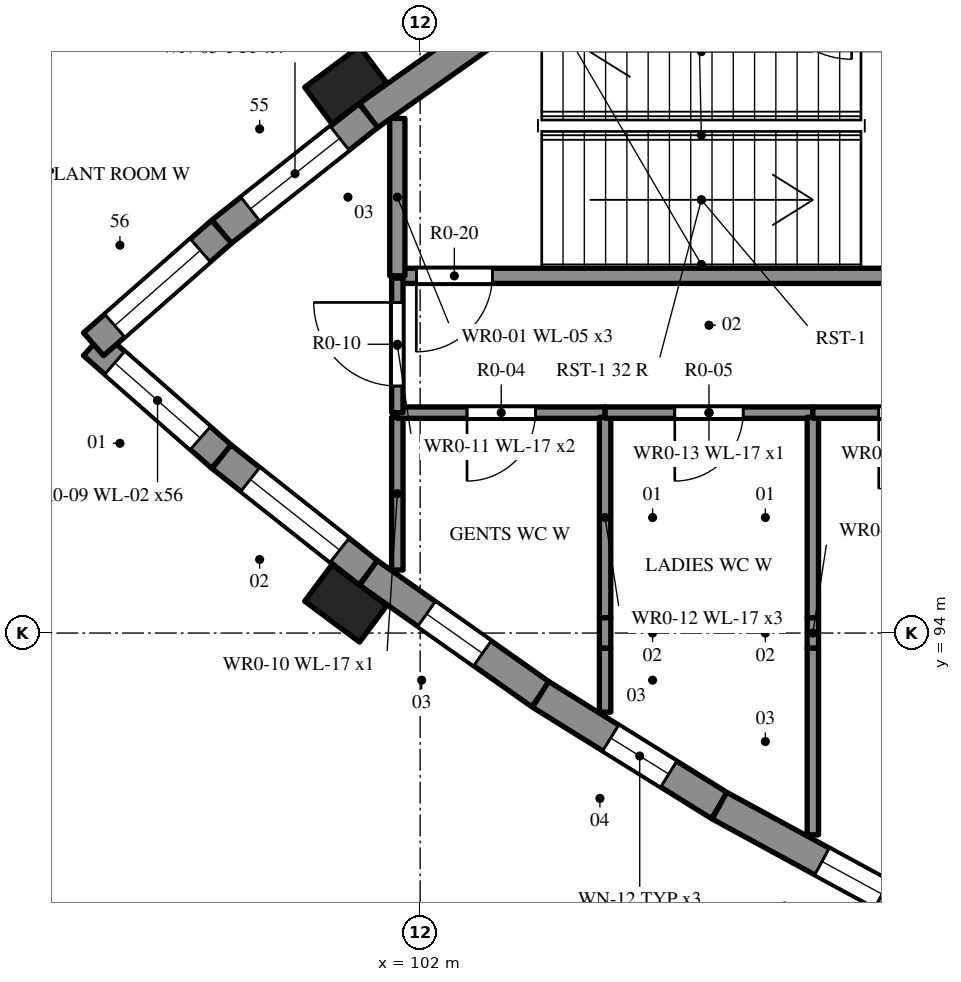
"""IFC4 building model, lengths in metres.
Left out: names, types, materials, properties, quantities, classifications, styles, units other than length and angle.
Written with IfcOpenShell. Run it as: python <this file> out.ifc"""

import sys

from ifc_helpers import new_model, si_unit, direction, frame, frame_2d, origin, origin_2d, place, context, subcontext, project, spatial, rectangle, extrude, element, fill, save


model = new_model("IFC4")
c1 = context("Model", 3, precision=1e-05, world=origin(), true_north=direction((0.0, 1.0)))
c2 = subcontext(c1, "Body", "Model", "MODEL_VIEW")
j1 = project(units=[si_unit("LENGTHUNIT", "METRE"), si_unit("PLANEANGLEUNIT", "RADIAN")], contexts=[c1])
p1 = place(None, origin())
s1 = spatial("IfcSite", under=j1, at=p1, CompositionType="ELEMENT")
p2 = place(p1, origin())
s2 = spatial("IfcBuilding", under=s1, at=p2, CompositionType="ELEMENT")
p3 = place(p2, origin())
s3 = spatial("IfcBuildingStorey", under=s2, at=p3, CompositionType="ELEMENT", Elevation=0.0)
p4 = place(p3, frame((109.9, 98.7, -0.25), z_axis=(0.0, 0.0, 1.0), x_axis=(-1.0, 0.0, 0.0)))
e1 = element("IfcWall", 1, at=p4, inside=s3, PredefinedType="SHEAR", context=c2, shape_type="SweptSolid", body=[
    extrude(rectangle(XDim=8.2, YDim=0.2, at=frame_2d((4.1, 0.0))), origin(), (0.0, 0.0, 1.0), 5.65),
])
p5 = place(p4, frame((6.95, 0.0, 0.25)))
e2 = element("IfcOpeningElement", 2, at=p5, cuts=e1, PredefinedType="OPENING", context=c2, shape_type="SweptSolid", body=[
    extrude(rectangle(XDim=1.0, YDim=2.4, at=frame_2d((0.5, 1.2))), frame((0.0, 0.11, 0.0), z_axis=(0.0, -1.0, 0.0), x_axis=(1.0, 0.0, 0.0)), (0.0, 0.0, 1.0), 0.22),
])
p6 = place(p3, frame((101.7, 98.7, -0.25), z_axis=(0.0, 0.0, 1.0), x_axis=(0.0, 1.0, 0.0)))
e3 = element("IfcWall", 3, at=p6, inside=s3, PredefinedType="SHEAR", context=c2, shape_type="SweptSolid", body=[
    extrude(rectangle(XDim=2.071, YDim=0.2, at=frame_2d((1.035, 0.0))), origin(), (0.0, 0.0, 1.0), 5.65),
])
p7 = place(p3, frame((97.703, 97.8, -0.25), z_axis=(0.0, 0.0, 1.0), x_axis=(0.751212351098, -0.660060605973, 0.0)))
e4 = element("IfcWall", 4, at=p7, inside=s3, PredefinedType="SOLIDWALL", context=c2, shape_type="SweptSolid", body=[
    extrude(rectangle(XDim=2.242, YDim=0.4, at=frame_2d((1.121, 0.0))), origin(), (0.0, 0.0, 1.0), 5.65),
])
p8 = place(p7, frame((0.371, 0.0, 2.65)))
e5 = element("IfcOpeningElement", 5, at=p8, cuts=e4, PredefinedType="OPENING", context=c2, shape_type="SweptSolid", body=[
    extrude(rectangle(XDim=1.5, YDim=0.6, at=frame_2d((0.75, 0.3))), frame((0.0, 0.21, 0.0), z_axis=(0.0, -1.0, 0.0), x_axis=(1.0, 0.0, 0.0)), (0.0, 0.0, 1.0), 0.42),
])
p9 = place(p3, frame((99.387, 96.32, -0.25), z_axis=(0.0, 0.0, 1.0), x_axis=(0.784278812541, -0.620408530082, 0.0)))
e6 = element("IfcWall", 6, at=p9, inside=s3, PredefinedType="SOLIDWALL", context=c2, shape_type="SweptSolid", body=[
    extrude(rectangle(XDim=2.464, YDim=0.4, at=frame_2d((1.232, 0.0))), origin(), (0.0, 0.0, 1.0), 5.65),
])
p10 = place(p9, frame((0.482, 0.0, 2.65)))
e7 = element("IfcOpeningElement", 7, at=p10, cuts=e6, PredefinedType="OPENING", context=c2, shape_type="SweptSolid", body=[
    extrude(rectangle(XDim=1.5, YDim=0.6, at=frame_2d((0.75, 0.3))), frame((0.0, 0.21, 0.0), z_axis=(0.0, -1.0, 0.0), x_axis=(1.0, 0.0, 0.0)), (0.0, 0.0, 1.0), 0.42),
])
p11 = place(p3, frame((101.32, 94.792, -0.25), z_axis=(0.0, 0.0, 1.0), x_axis=(0.817028877428, -0.576596751161, 0.0)))
e8 = element("IfcWall", 8, at=p11, inside=s3, PredefinedType="SOLIDWALL", context=c2, shape_type="SweptSolid", body=[
    extrude(rectangle(XDim=2.772, YDim=0.4, at=frame_2d((1.386, 0.0))), origin(), (0.0, 0.0, 1.0), 5.65),
])
p12 = place(p11, frame((0.936, 0.0, 1.85)))
e9 = element("IfcOpeningElement", 9, at=p12, cuts=e8, PredefinedType="OPENING", context=c2, shape_type="SweptSolid", body=[
    extrude(rectangle(XDim=0.9, YDim=0.6, at=frame_2d((0.45, 0.3))), frame((0.0, 0.21, 0.0), z_axis=(0.0, -1.0, 0.0), x_axis=(1.0, 0.0, 0.0)), (0.0, 0.0, 1.0), 0.42),
])
p13 = place(p3, frame((103.585, 93.193, -0.25), z_axis=(0.0, 0.0, 1.0), x_axis=(0.84912946359, -0.528184772653, 0.0)))
e10 = element("IfcWall", 10, at=p13, inside=s3, PredefinedType="SOLIDWALL", context=c2, shape_type="SweptSolid", body=[
    extrude(rectangle(XDim=2.772, YDim=0.4, at=frame_2d((1.386, 0.0))), origin(), (0.0, 0.0, 1.0), 5.65),
])
p14 = place(p13, frame((1.086, 0.0, 1.85)))
e11 = element("IfcOpeningElement", 11, at=p14, cuts=e10, PredefinedType="OPENING", context=c2, shape_type="SweptSolid", body=[
    extrude(rectangle(XDim=0.9, YDim=0.6, at=frame_2d((0.45, 0.3))), frame((0.0, 0.21, 0.0), z_axis=(0.0, -1.0, 0.0), x_axis=(1.0, 0.0, 0.0)), (0.0, 0.0, 1.0), 0.42),
])
p15 = place(p3, frame((105.938, 91.729, -0.25), z_axis=(0.0, 0.0, 1.0), x_axis=(0.878292493566, -0.478123724308, 0.0)))
e12 = element("IfcWall", 12, at=p15, inside=s3, PredefinedType="SOLIDWALL", context=c2, shape_type="SweptSolid", body=[
    extrude(rectangle(XDim=2.772, YDim=0.4, at=frame_2d((1.386, 0.0))), origin(), (0.0, 0.0, 1.0), 5.65),
])
p16 = place(p15, frame((1.536, 0.0, 1.85)))
e13 = element("IfcOpeningElement", 13, at=p16, cuts=e12, PredefinedType="OPENING", context=c2, shape_type="SweptSolid", body=[
    extrude(rectangle(XDim=0.9, YDim=0.6, at=frame_2d((0.45, 0.3))), frame((0.0, 0.21, 0.0), z_axis=(0.0, -1.0, 0.0), x_axis=(1.0, 0.0, 0.0)), (0.0, 0.0, 1.0), 0.42),
])
p17 = place(p3, frame((103.585, 102.407, -0.25), z_axis=(0.0, 0.0, 1.0), x_axis=(-0.817070367038, -0.57653795652, 0.0)))
e14 = element("IfcWall", 14, at=p17, inside=s3, PredefinedType="SOLIDWALL", context=c2, shape_type="SweptSolid", body=[
    extrude(rectangle(XDim=2.772, YDim=0.4, at=frame_2d((1.386, 0.0))), origin(), (0.0, 0.0, 1.0), 5.65),
])
p18 = place(p3, frame((101.32, 100.809, -0.25), z_axis=(0.0, 0.0, 1.0), x_axis=(-0.784278812541, -0.620408530082, 0.0)))
e15 = element("IfcWall", 15, at=p18, inside=s3, PredefinedType="SOLIDWALL", context=c2, shape_type="SweptSolid", body=[
    extrude(rectangle(XDim=2.464, YDim=0.4, at=frame_2d((1.232, 0.0))), origin(), (0.0, 0.0, 1.0), 5.65),
])
p19 = place(p18, frame((0.482, 0.0, 2.65)))
e16 = element("IfcOpeningElement", 16, at=p19, cuts=e15, PredefinedType="OPENING", context=c2, shape_type="SweptSolid", body=[
    extrude(rectangle(XDim=1.5, YDim=0.6, at=frame_2d((0.75, 0.3))), frame((0.0, 0.21, 0.0), z_axis=(0.0, -1.0, 0.0), x_axis=(1.0, 0.0, 0.0)), (0.0, 0.0, 1.0), 0.42),
])
p20 = place(p3, frame((99.387, 99.28, -0.25), z_axis=(0.0, 0.0, 1.0), x_axis=(-0.751212351098, -0.660060605973, 0.0)))
e17 = element("IfcWall", 17, at=p20, inside=s3, PredefinedType="SOLIDWALL", context=c2, shape_type="SweptSolid", body=[
    extrude(rectangle(XDim=2.242, YDim=0.4, at=frame_2d((1.121, 0.0))), origin(), (0.0, 0.0, 1.0), 5.65),
])
p21 = place(p20, frame((0.371, 0.0, 2.65)))
e18 = element("IfcOpeningElement", 18, at=p21, cuts=e17, PredefinedType="OPENING", context=c2, shape_type="SweptSolid", body=[
    extrude(rectangle(XDim=1.5, YDim=0.6, at=frame_2d((0.75, 0.3))), frame((0.0, 0.21, 0.0), z_axis=(0.0, -1.0, 0.0), x_axis=(1.0, 0.0, 0.0)), (0.0, 0.0, 1.0), 0.42),
])
for number, where, z_axis, x_axis in (
    (19, (101.021, 94.391, -0.25), (0.0, 0.0, 1.0), (0.802, -0.597, 0.0)),
    (20, (101.021, 101.209, -0.25), (0.0, 0.0, 1.0), (-0.802, -0.597, 0.0)),
):
    element("IfcColumn", number, at=place(p3, frame(where, z_axis=z_axis, x_axis=x_axis)), inside=s3, PredefinedType="PILASTER", context=c2, shape_type="SweptSolid", body=[
        extrude(rectangle(XDim=0.9, YDim=0.6, at=origin_2d()), origin(), (0.0, 0.0, 1.0), 5.65),
    ])
p22 = place(p3, frame((101.7, 94.829, 0.0), z_axis=(0.0, 0.0, 1.0), x_axis=(0.0, 1.0, 0.0)))
e21 = element("IfcWall", 21, at=p22, inside=s3, PredefinedType="PARTITIONING", context=c2, shape_type="SweptSolid", body=[
    extrude(rectangle(XDim=2.011, YDim=0.15, at=frame_2d((1.005, 0.0))), origin(), (0.0, 0.0, 1.0), 5.12),
])
p23 = place(p3, frame((104.433, 96.9, 0.0), z_axis=(0.0, 0.0, 1.0), x_axis=(-1.0, 0.0, 0.0)))
e22 = element("IfcWall", 22, at=p23, inside=s3, PredefinedType="PARTITIONING", context=c2, shape_type="SweptSolid", body=[
    extrude(rectangle(XDim=2.733, YDim=0.15, at=frame_2d((1.367, 0.0))), origin(), (0.0, 0.0, 1.0), 5.12),
])
p24 = place(p23, frame((0.917, 0.0, 0.0)))
e23 = element("IfcOpeningElement", 23, at=p24, cuts=e22, PredefinedType="OPENING", context=c2, shape_type="SweptSolid", body=[
    extrude(rectangle(XDim=0.9, YDim=2.1, at=frame_2d((0.45, 1.05))), frame((0.0, 0.085, 0.0), z_axis=(0.0, -1.0, 0.0), x_axis=(1.0, 0.0, 0.0)), (0.0, 0.0, 1.0), 0.17),
])
p25 = place(p3, frame((101.7, 96.9, 0.0), z_axis=(0.0, 0.0, 1.0), x_axis=(0.0, 1.0, 0.0)))
e24 = element("IfcWall", 24, at=p25, inside=s3, PredefinedType="PARTITIONING", context=c2, shape_type="SweptSolid", body=[
    extrude(rectangle(XDim=1.77, YDim=0.15, at=frame_2d((0.885, 0.0))), origin(), (0.0, 0.0, 1.0), 5.12),
])
p26 = place(p25, frame((0.35, 0.0, 0.0)))
e25 = element("IfcOpeningElement", 25, at=p26, cuts=e24, PredefinedType="OPENING", context=c2, shape_type="SweptSolid", body=[
    extrude(rectangle(XDim=1.1, YDim=2.1, at=frame_2d((0.55, 1.05))), frame((0.0, 0.085, 0.0), z_axis=(0.0, -1.0, 0.0), x_axis=(1.0, 0.0, 0.0)), (0.0, 0.0, 1.0), 0.17),
])
p27 = place(p3, frame((104.433, 96.84, 0.0), z_axis=(0.0, 0.0, 1.0), x_axis=(0.0, -1.0, 0.0)))
e26 = element("IfcWall", 26, at=p27, inside=s3, PredefinedType="PARTITIONING", context=c2, shape_type="SweptSolid", body=[
    extrude(rectangle(XDim=2.64, YDim=0.15, at=frame_2d((1.32, 0.0))), origin(), (0.0, 0.0, 1.0), 5.12),
])
p28 = place(p3, frame((104.433, 94.2, 0.0), z_axis=(0.0, 0.0, 1.0), x_axis=(0.0, -1.0, 0.0)))
e27 = element("IfcWall", 27, at=p28, inside=s3, PredefinedType="PARTITIONING", context=c2, shape_type="SweptSolid", body=[
    extrude(rectangle(XDim=0.4, YDim=0.15, at=frame_2d((0.2, 0.0))), origin(), (0.0, 0.0, 1.0), 4.32),
])
p29 = place(p3, frame((104.433, 93.8, 0.0), z_axis=(0.0, 0.0, 1.0), x_axis=(0.0, -1.0, 0.0)))
e28 = element("IfcWall", 28, at=p29, inside=s3, PredefinedType="PARTITIONING", context=c2, shape_type="SweptSolid", body=[
    extrude(rectangle(XDim=0.84, YDim=0.15, at=frame_2d((0.42, 0.0))), origin(), (0.0, 0.0, 1.0), 5.12),
])
p30 = place(p3, frame((107.167, 96.9, 0.0), z_axis=(0.0, 0.0, 1.0), x_axis=(-1.0, 0.0, 0.0)))
e29 = element("IfcWall", 29, at=p30, inside=s3, PredefinedType="PARTITIONING", context=c2, shape_type="SweptSolid", body=[
    extrude(rectangle(XDim=2.733, YDim=0.15, at=frame_2d((1.367, 0.0))), origin(), (0.0, 0.0, 1.0), 5.12),
])
p31 = place(p30, frame((0.917, 0.0, 0.0)))
e30 = element("IfcOpeningElement", 30, at=p31, cuts=e29, PredefinedType="OPENING", context=c2, shape_type="SweptSolid", body=[
    extrude(rectangle(XDim=0.9, YDim=2.1, at=frame_2d((0.45, 1.05))), frame((0.0, 0.085, 0.0), z_axis=(0.0, -1.0, 0.0), x_axis=(1.0, 0.0, 0.0)), (0.0, 0.0, 1.0), 0.17),
])
p32 = place(p3, frame((107.167, 96.84, 0.0), z_axis=(0.0, 0.0, 1.0), x_axis=(0.0, -1.0, 0.0)))
e31 = element("IfcWall", 31, at=p32, inside=s3, PredefinedType="PARTITIONING", context=c2, shape_type="SweptSolid", body=[
    extrude(rectangle(XDim=2.64, YDim=0.15, at=frame_2d((1.32, 0.0))), origin(), (0.0, 0.0, 1.0), 5.12),
])
p33 = place(p3, frame((107.167, 94.2, 0.0), z_axis=(0.0, 0.0, 1.0), x_axis=(0.0, -1.0, 0.0)))
e32 = element("IfcWall", 32, at=p33, inside=s3, PredefinedType="PARTITIONING", context=c2, shape_type="SweptSolid", body=[
    extrude(rectangle(XDim=0.4, YDim=0.15, at=frame_2d((0.2, 0.0))), origin(), (0.0, 0.0, 1.0), 4.32),
])
p34 = place(p3, frame((107.167, 93.8, 0.0), z_axis=(0.0, 0.0, 1.0), x_axis=(0.0, -1.0, 0.0)))
e33 = element("IfcWall", 33, at=p34, inside=s3, PredefinedType="PARTITIONING", context=c2, shape_type="SweptSolid", body=[
    extrude(rectangle(XDim=2.455, YDim=0.15, at=frame_2d((1.228, 0.0))), origin(), (0.0, 0.0, 1.0), 5.12),
])
p35 = place(p3, frame((109.9, 96.9, 0.0), z_axis=(0.0, 0.0, 1.0), x_axis=(-1.0, 0.0, 0.0)))
e34 = element("IfcWall", 34, at=p35, inside=s3, PredefinedType="PARTITIONING", context=c2, shape_type="SweptSolid", body=[
    extrude(rectangle(XDim=2.733, YDim=0.15, at=frame_2d((1.367, 0.0))), origin(), (0.0, 0.0, 1.0), 5.12),
])
p36 = place(p35, frame((0.867, 0.0, 0.0)))
e35 = element("IfcOpeningElement", 35, at=p36, cuts=e34, PredefinedType="OPENING", context=c2, shape_type="SweptSolid", body=[
    extrude(rectangle(XDim=1.0, YDim=2.1, at=frame_2d((0.5, 1.05))), frame((0.0, 0.085, 0.0), z_axis=(0.0, -1.0, 0.0), x_axis=(1.0, 0.0, 0.0)), (0.0, 0.0, 1.0), 0.17),
])
p37 = place(p8, origin())
e36 = element("IfcWindow", 36, at=p37, inside=s3, PartitioningType="SINGLE_PANEL", PredefinedType="WINDOW", context=c2, shape_type="SweptSolid", body=[
    extrude(rectangle(XDim=1.5, YDim=0.6, at=frame_2d((0.75, 0.3))), frame((0.0, 0.03, 0.0), z_axis=(0.0, -1.0, 0.0), x_axis=(1.0, 0.0, 0.0)), (0.0, 0.0, 1.0), 0.06),
])
fill(e5, e36)
p38 = place(p10, origin())
e37 = element("IfcWindow", 37, at=p38, inside=s3, PartitioningType="SINGLE_PANEL", PredefinedType="WINDOW", context=c2, shape_type="SweptSolid", body=[
    extrude(rectangle(XDim=1.5, YDim=0.6, at=frame_2d((0.75, 0.3))), frame((0.0, 0.03, 0.0), z_axis=(0.0, -1.0, 0.0), x_axis=(1.0, 0.0, 0.0)), (0.0, 0.0, 1.0), 0.06),
])
fill(e7, e37)
p39 = place(p12, origin())
e38 = element("IfcWindow", 38, at=p39, inside=s3, PartitioningType="SINGLE_PANEL", PredefinedType="WINDOW", context=c2, shape_type="SweptSolid", body=[
    extrude(rectangle(XDim=0.9, YDim=0.6, at=frame_2d((0.45, 0.3))), frame((0.0, 0.03, 0.0), z_axis=(0.0, -1.0, 0.0), x_axis=(1.0, 0.0, 0.0)), (0.0, 0.0, 1.0), 0.06),
])
fill(e9, e38)
p40 = place(p14, origin())
e39 = element("IfcWindow", 39, at=p40, inside=s3, PartitioningType="SINGLE_PANEL", PredefinedType="WINDOW", context=c2, shape_type="SweptSolid", body=[
    extrude(rectangle(XDim=0.9, YDim=0.6, at=frame_2d((0.45, 0.3))), frame((0.0, 0.03, 0.0), z_axis=(0.0, -1.0, 0.0), x_axis=(1.0, 0.0, 0.0)), (0.0, 0.0, 1.0), 0.06),
])
fill(e11, e39)
p41 = place(p16, origin())
e40 = element("IfcWindow", 40, at=p41, inside=s3, PartitioningType="SINGLE_PANEL", PredefinedType="WINDOW", context=c2, shape_type="SweptSolid", body=[
    extrude(rectangle(XDim=0.9, YDim=0.6, at=frame_2d((0.45, 0.3))), frame((0.0, 0.03, 0.0), z_axis=(0.0, -1.0, 0.0), x_axis=(1.0, 0.0, 0.0)), (0.0, 0.0, 1.0), 0.06),
])
fill(e13, e40)
p42 = place(p19, origin())
e41 = element("IfcWindow", 41, at=p42, inside=s3, PartitioningType="SINGLE_PANEL", PredefinedType="WINDOW", context=c2, shape_type="SweptSolid", body=[
    extrude(rectangle(XDim=1.5, YDim=0.6, at=frame_2d((0.75, 0.3))), frame((0.0, 0.03, 0.0), z_axis=(0.0, -1.0, 0.0), x_axis=(1.0, 0.0, 0.0)), (0.0, 0.0, 1.0), 0.06),
])
fill(e16, e41)
p43 = place(p21, origin())
e42 = element("IfcWindow", 42, at=p43, inside=s3, PartitioningType="SINGLE_PANEL", PredefinedType="WINDOW", context=c2, shape_type="SweptSolid", body=[
    extrude(rectangle(XDim=1.5, YDim=0.6, at=frame_2d((0.75, 0.3))), frame((0.0, 0.03, 0.0), z_axis=(0.0, -1.0, 0.0), x_axis=(1.0, 0.0, 0.0)), (0.0, 0.0, 1.0), 0.06),
])
fill(e18, e42)
p44 = place(p24, origin())
e43 = element("IfcDoor", 43, at=p44, inside=s3, OperationType="SINGLE_SWING_RIGHT", PredefinedType="DOOR", context=c2, shape_type="SweptSolid", body=[
    extrude(rectangle(XDim=0.9, YDim=2.1, at=frame_2d((0.45, 1.05))), frame((0.0, 0.025, 0.0), z_axis=(0.0, -1.0, 0.0), x_axis=(1.0, 0.0, 0.0)), (0.0, 0.0, 1.0), 0.05),
])
fill(e23, e43)
p45 = place(p31, origin())
e44 = element("IfcDoor", 44, at=p45, inside=s3, OperationType="SINGLE_SWING_RIGHT", PredefinedType="DOOR", context=c2, shape_type="SweptSolid", body=[
    extrude(rectangle(XDim=0.9, YDim=2.1, at=frame_2d((0.45, 1.05))), frame((0.0, 0.025, 0.0), z_axis=(0.0, -1.0, 0.0), x_axis=(1.0, 0.0, 0.0)), (0.0, 0.0, 1.0), 0.05),
])
fill(e30, e44)
p46 = place(p36, origin())
e45 = element("IfcDoor", 45, at=p46, inside=s3, OperationType="SINGLE_SWING_RIGHT", PredefinedType="DOOR", context=c2, shape_type="SweptSolid", body=[
    extrude(rectangle(XDim=1.0, YDim=2.1, at=frame_2d((0.5, 1.05))), frame((0.0, 0.025, 0.0), z_axis=(0.0, -1.0, 0.0), x_axis=(1.0, 0.0, 0.0)), (0.0, 0.0, 1.0), 0.05),
])
fill(e35, e45)
p47 = place(p26, origin())
e46 = element("IfcDoor", 46, at=p47, inside=s3, OperationType="SINGLE_SWING_RIGHT", PredefinedType="DOOR", context=c2, shape_type="SweptSolid", body=[
    extrude(rectangle(XDim=1.1, YDim=2.1, at=frame_2d((0.55, 1.05))), frame((0.0, 0.025, 0.0), z_axis=(0.0, -1.0, 0.0), x_axis=(1.0, 0.0, 0.0)), (0.0, 0.0, 1.0), 0.05),
])
fill(e25, e46)
p48 = place(p5, origin())
e47 = element("IfcDoor", 47, at=p48, inside=s3, OperationType="SINGLE_SWING_RIGHT", PredefinedType="DOOR", context=c2, shape_type="SweptSolid", body=[
    extrude(rectangle(XDim=1.0, YDim=2.4, at=frame_2d((0.5, 1.2))), frame((0.0, 0.025, 0.0), z_axis=(0.0, -1.0, 0.0), x_axis=(1.0, 0.0, 0.0)), (0.0, 0.0, 1.0), 0.05),
])
fill(e2, e47)
save(model, sys.argv[1])
